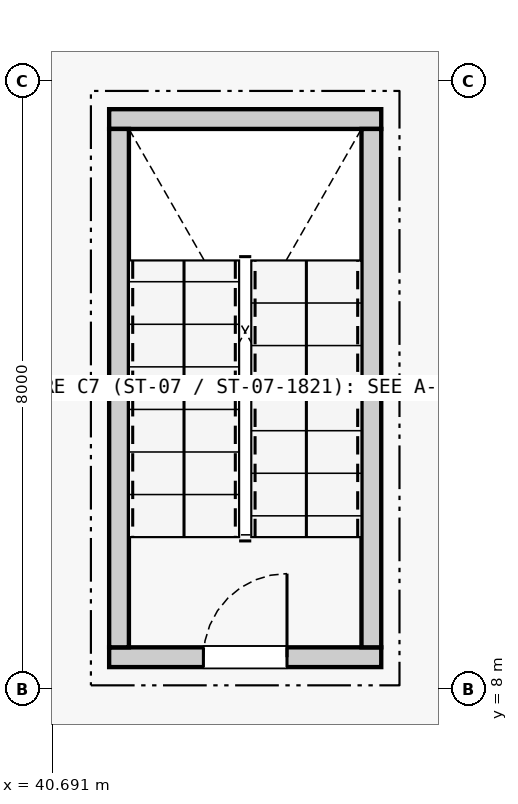
"""IFC4 building model, lengths in metres.
Left out: names, types, materials, properties, quantities, classifications, styles, units other than length and angle.
Written with IfcOpenShell. Run it as: python <this file> out.ifc"""

import sys

from ifc_helpers import new_model, si_unit, direction, frame, frame_2d, origin, place, context, subcontext, project, spatial, rectangle, extrude, element, fill, save


model = new_model("IFC4")
c1 = context("Model", 3, precision=1e-05, world=origin(), true_north=direction((0.0, 1.0)))
c2 = subcontext(c1, "Body", "Model", "MODEL_VIEW")
j1 = project(units=[si_unit("LENGTHUNIT", "METRE"), si_unit("PLANEANGLEUNIT", "RADIAN")], contexts=[c1])
p1 = place(None, origin())
s1 = spatial("IfcSite", under=j1, at=p1, CompositionType="ELEMENT")
p2 = place(p1, origin())
s2 = spatial("IfcBuilding", under=s1, at=p2, CompositionType="ELEMENT")
p3 = place(p2, frame((0.0, 0.0, 5.4)))
s3 = spatial("IfcBuildingStorey", under=s2, at=p3, CompositionType="ELEMENT", Elevation=5.4)
p4 = place(p3, frame((41.44, 8.42, 0.0), z_axis=(0.0, 0.0, 1.0), x_axis=(1.0, 0.0, 0.0)))
e1 = element("IfcWall", 1, at=p4, inside=s3, PredefinedType="SOLIDWALL", context=c2, shape_type="SweptSolid", body=[
    extrude(rectangle(XDim=3.58, YDim=0.26, at=frame_2d((1.79, 0.0))), origin(), (0.0, 0.0, 1.0), 5.1),
])
p5 = place(p4, frame((1.24, 0.0, 0.0)))
e2 = element("IfcOpeningElement", 2, at=p5, cuts=e1, PredefinedType="OPENING", context=c2, shape_type="SweptSolid", body=[
    extrude(rectangle(XDim=1.1, YDim=2.2, at=frame_2d((0.55, 1.1))), frame((0.0, 0.142, 0.0), z_axis=(0.0, -1.0, 0.0), x_axis=(1.0, 0.0, 0.0)), (0.0, 0.0, 1.0), 0.284),
])
p6 = place(p3, frame((41.44, 15.5, 0.0), z_axis=(0.0, 0.0, 1.0), x_axis=(1.0, 0.0, 0.0)))
e3 = element("IfcWall", 3, at=p6, inside=s3, PredefinedType="SOLIDWALL", context=c2, shape_type="SweptSolid", body=[
    extrude(rectangle(XDim=3.58, YDim=0.26, at=frame_2d((1.79, 0.0))), origin(), (0.0, 0.0, 1.0), 5.1),
])
for number, where, z_axis, x_axis in (
    (4, (41.57, 8.55, 0.0), (0.0, 0.0, 1.0), (0.0, 1.0, 0.0)),
    (5, (44.89, 8.55, 0.0), (0.0, 0.0, 1.0), (0.0, 1.0, 0.0)),
):
    element("IfcWall", number, at=place(p3, frame(where, z_axis=z_axis, x_axis=x_axis)), inside=s3, PredefinedType="SOLIDWALL", context=c2, shape_type="SweptSolid", body=[
        extrude(rectangle(XDim=6.82, YDim=0.26, at=frame_2d((3.41, 0.0))), origin(), (0.0, 0.0, 1.0), 5.1),
    ])
p7 = place(p5, origin())
e6 = element("IfcDoor", 6, at=p7, inside=s3, OperationType="SINGLE_SWING_RIGHT", PredefinedType="DOOR", context=c2, shape_type="SweptSolid", body=[
    extrude(rectangle(XDim=1.1, YDim=2.2, at=frame_2d((0.55, 1.1))), frame((0.0, 0.025, 0.0), z_axis=(0.0, -1.0, 0.0), x_axis=(1.0, 0.0, 0.0)), (0.0, 0.0, 1.0), 0.05),
])
fill(e2, e6)
save(model, sys.argv[1])
